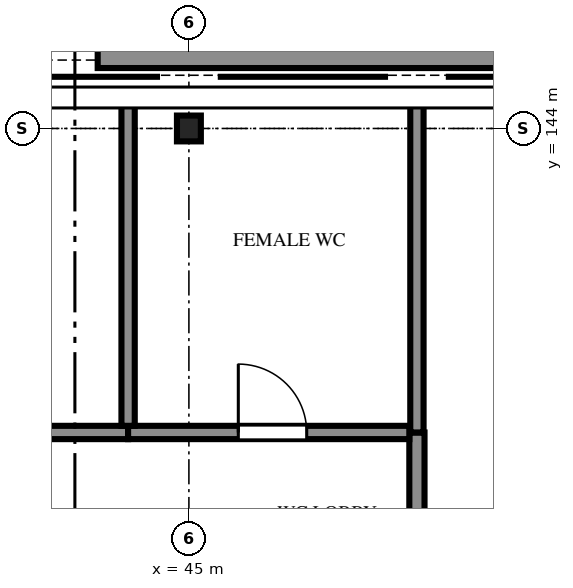
"""IFC4 building model, lengths in metres.
Left out: names, types, materials, properties, quantities, classifications, styles, units other than length and angle.
Written with IfcOpenShell. Run it as: python <this file> out.ifc"""

import sys

from ifc_helpers import new_model, si_unit, direction, frame, frame_2d, origin, origin_2d, place, context, subcontext, project, spatial, polyline, rectangle, i_section, outline, extrude, element, fill, save


model = new_model("IFC4")
c1 = context("Model", 3, precision=1e-05, world=origin(), true_north=direction((0.0, 1.0)))
c2 = subcontext(c1, "Body", "Model", "MODEL_VIEW")
j1 = project(units=[si_unit("LENGTHUNIT", "METRE"), si_unit("PLANEANGLEUNIT", "RADIAN")], contexts=[c1])
p1 = place(None, origin())
s1 = spatial("IfcSite", under=j1, at=p1, CompositionType="ELEMENT")
p2 = place(p1, origin())
s2 = spatial("IfcBuilding", under=s1, at=p2, CompositionType="ELEMENT")
p3 = place(p2, frame((0.0, 0.0, 32.7)))
s3 = spatial("IfcBuildingStorey", under=s2, at=p3, CompositionType="ELEMENT", Elevation=32.7)
p4 = place(p3, frame((45.0, 144.0, 0.0), z_axis=(0.0, 0.0, 1.0), x_axis=(1.0, 0.0, 0.0)))
e1 = element("IfcColumn", 1, at=p4, inside=s3, PredefinedType="COLUMN", context=c2, shape_type="SweptSolid", body=[
    extrude(i_section(OverallWidth=0.314, OverallDepth=0.34, WebThickness=0.019, FlangeThickness=0.031, FilletRadius=0.015, at=origin_2d()), origin(), (0.0, 0.0, 1.0), 4.2),
])
p5 = place(p3, frame((43.8, 145.62, 0.0), z_axis=(0.0, 0.0, 1.0), x_axis=(1.0, 0.0, 0.0)))
e2 = element("IfcWall", 2, at=p5, inside=s3, PredefinedType="SOLIDWALL", context=c2, shape_type="SweptSolid", body=[
    extrude(outline(polyline([(11.4, 0.0), (11.4, 4.2), (0.0, 4.2), (0.0, 0.0), (11.4, 0.0)])), frame((0.0, 0.825, 0.0), z_axis=(0.0, -1.0, 0.0), x_axis=(1.0, 0.0, 0.0)), (0.0, 0.0, 1.0), 1.65),
])
p6 = place(p3, frame((48.0, 140.0, 0.0), z_axis=(0.0, 0.0, 1.0), x_axis=(0.0, -1.0, 0.0)))
e3 = element("IfcWall", 3, at=p6, inside=s3, PredefinedType="PARTITIONING", context=c2, shape_type="SweptSolid", body=[
    extrude(rectangle(XDim=2.0, YDim=0.2, at=frame_2d((1.0, 0.0))), origin(), (0.0, 0.0, 1.0), 3.382),
])
p7 = place(p3, frame((40.4, 140.0, 0.0), z_axis=(0.0, 0.0, 1.0), x_axis=(1.0, 0.0, 0.0)))
e4 = element("IfcWall", 4, at=p7, inside=s3, PredefinedType="PARTITIONING", context=c2, shape_type="SweptSolid", body=[
    extrude(rectangle(XDim=3.8, YDim=0.175, at=frame_2d((1.9, 0.0))), origin(), (0.0, 0.0, 1.0), 3.382),
])
p8 = place(p7, frame((1.45, 0.0, 0.0)))
e5 = element("IfcOpeningElement", 5, at=p8, cuts=e4, PredefinedType="OPENING", context=c2, shape_type="SweptSolid", body=[
    extrude(rectangle(XDim=0.9, YDim=2.1, at=frame_2d((0.45, 1.05))), frame((0.0, 0.097, 0.0), z_axis=(0.0, -1.0, 0.0), x_axis=(1.0, 0.0, 0.0)), (0.0, 0.0, 1.0), 0.195),
])
p9 = place(p3, frame((44.2, 140.0, 0.0), z_axis=(0.0, 0.0, 1.0), x_axis=(1.0, 0.0, 0.0)))
e6 = element("IfcWall", 6, at=p9, inside=s3, PredefinedType="PARTITIONING", context=c2, shape_type="SweptSolid", body=[
    extrude(rectangle(XDim=3.7, YDim=0.175, at=frame_2d((1.85, 0.0))), origin(), (0.0, 0.0, 1.0), 3.382),
])
p10 = place(p9, frame((1.45, 0.0, 0.0)))
e7 = element("IfcOpeningElement", 7, at=p10, cuts=e6, PredefinedType="OPENING", context=c2, shape_type="SweptSolid", body=[
    extrude(rectangle(XDim=0.9, YDim=2.1, at=frame_2d((0.45, 1.05))), frame((0.0, 0.097, 0.0), z_axis=(0.0, -1.0, 0.0), x_axis=(1.0, 0.0, 0.0)), (0.0, 0.0, 1.0), 0.195),
])
p11 = place(p3, frame((44.2, 144.315, 0.0), z_axis=(0.0, 0.0, 1.0), x_axis=(0.0, -1.0, 0.0)))
e8 = element("IfcWall", 8, at=p11, inside=s3, PredefinedType="PARTITIONING", context=c2, shape_type="SweptSolid", body=[
    extrude(rectangle(XDim=4.228, YDim=0.175, at=frame_2d((2.114, 0.0))), origin(), (0.0, 0.0, 1.0), 3.382),
])
p12 = place(p3, frame((48.0, 144.315, 0.0), z_axis=(0.0, 0.0, 1.0), x_axis=(0.0, -1.0, 0.0)))
e9 = element("IfcWall", 9, at=p12, inside=s3, PredefinedType="PARTITIONING", context=c2, shape_type="SweptSolid", body=[
    extrude(rectangle(XDim=4.315, YDim=0.175, at=frame_2d((2.157, 0.0))), origin(), (0.0, 0.0, 1.0), 3.382),
])
p13 = place(p10, origin())
e10 = element("IfcDoor", 10, at=p13, inside=s3, OperationType="SINGLE_SWING_LEFT", PredefinedType="DOOR", context=c2, shape_type="SweptSolid", body=[
    extrude(outline(polyline([(0.0, 0.0), (0.07, 0.0), (0.07, 2.03), (0.83, 2.03), (0.83, 0.0), (0.9, 0.0), (0.9, 2.1), (0.0, 2.1), (0.0, 0.0)])), frame((0.0, 0.025, 0.0), z_axis=(0.0, -1.0, 0.0), x_axis=(1.0, 0.0, 0.0)), (0.0, 0.0, 1.0), 0.05),
    extrude(outline(polyline([(0.074, 0.01), (0.826, 0.01), (0.826, 2.026), (0.074, 2.026), (0.074, 0.01)]), holes=[polyline([(0.194, 0.16), (0.706, 0.16), (0.706, 1.01), (0.194, 1.01), (0.194, 0.16)]), polyline([(0.3, 1.16), (0.6, 1.16), (0.6, 1.76), (0.3, 1.76), (0.3, 1.16)])]), frame((0.0, 0.017, 0.0), z_axis=(0.0, -1.0, 0.0), x_axis=(1.0, 0.0, 0.0)), (0.0, 0.0, 1.0), 0.035),
    extrude(rectangle(XDim=0.512, YDim=0.85, at=frame_2d((0.45, 0.585))), frame((0.0, 0.009, 0.0), z_axis=(0.0, -1.0, 0.0), x_axis=(1.0, 0.0, 0.0)), (0.0, 0.0, 1.0), 0.017),
    extrude(rectangle(XDim=0.3, YDim=0.6, at=frame_2d((0.45, 1.46))), frame((0.0, 0.006, 0.0), z_axis=(0.0, -1.0, 0.0), x_axis=(1.0, 0.0, 0.0)), (0.0, 0.0, 1.0), 0.012),
])
fill(e7, e10)
save(model, sys.argv[1])
